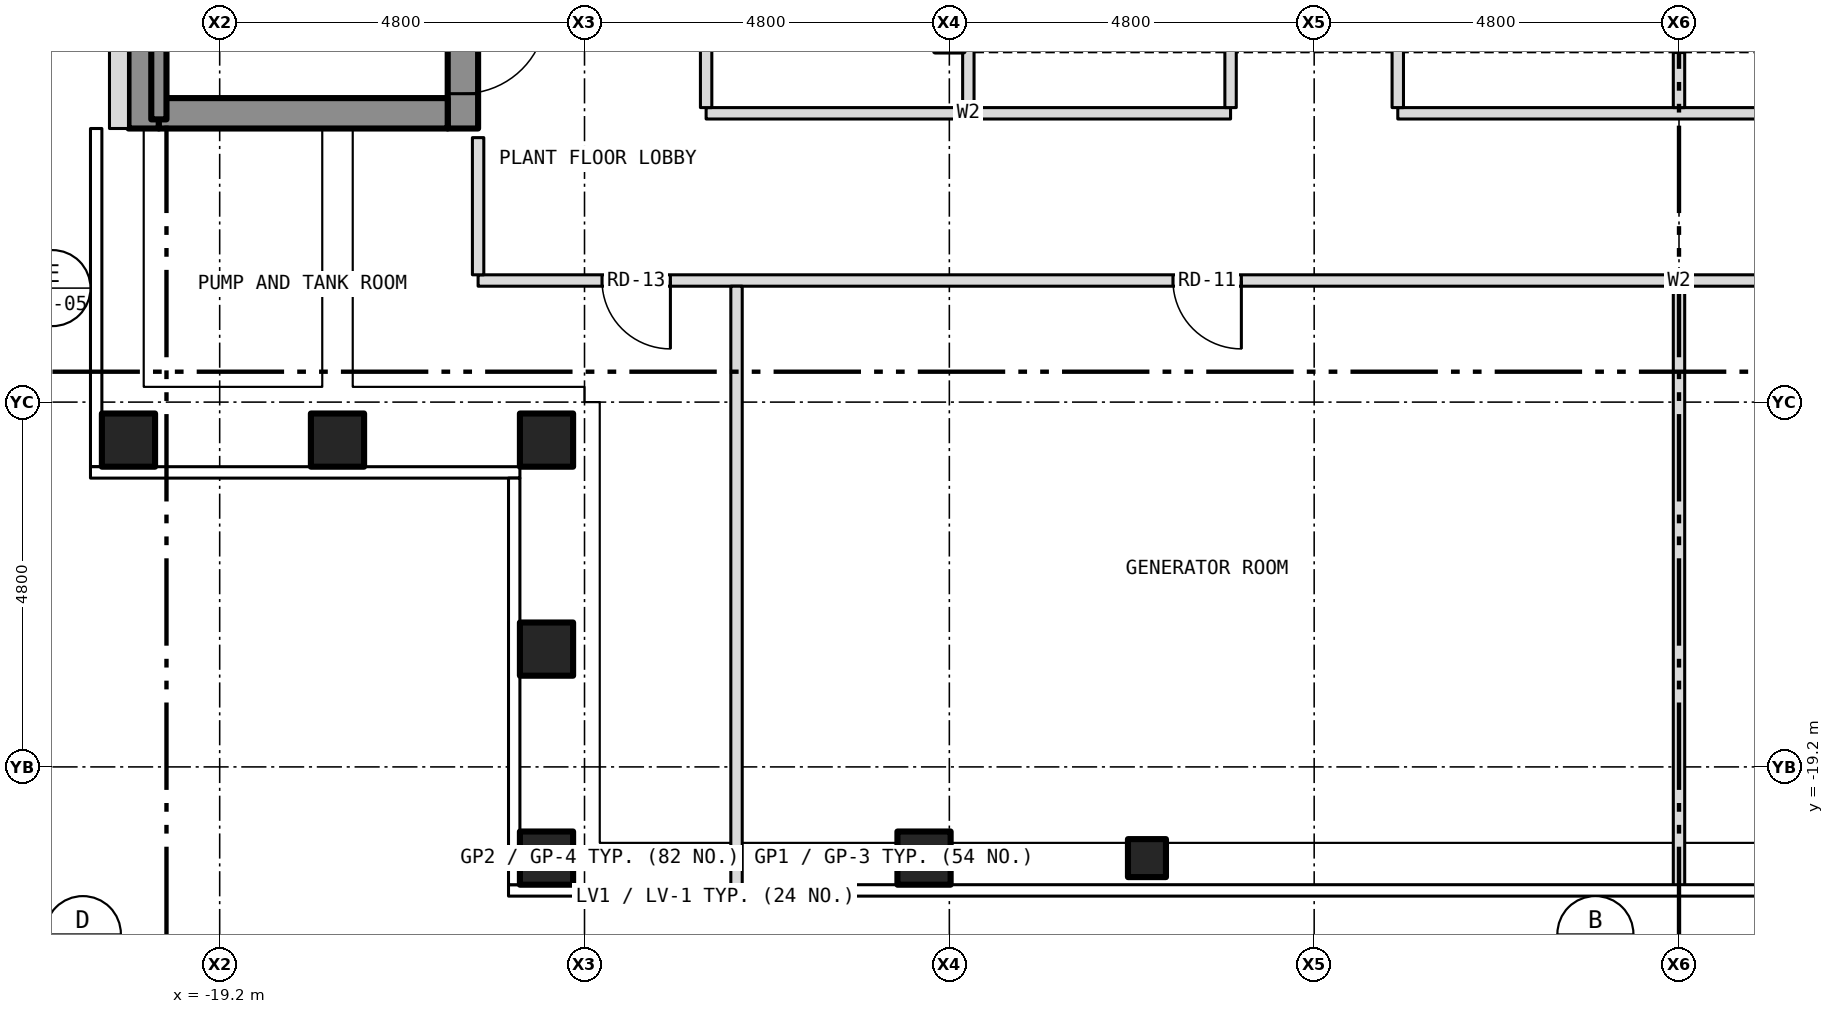
"""IFC4 building model, lengths in metres.
Left out: names, types, materials, properties, quantities, classifications, styles, units other than length and angle.
Written with IfcOpenShell. Run it as: python <this file> out.ifc"""

import sys

from ifc_helpers import new_model, si_unit, direction, frame, frame_2d, origin, origin_2d, place, context, subcontext, project, spatial, rectangle, hollow_rectangle, extrude, element, fill, save


model = new_model("IFC4")
c1 = context("Model", 3, precision=1e-05, world=origin(), true_north=direction((0.0, 1.0)))
c2 = subcontext(c1, "Body", "Model", "MODEL_VIEW")
j1 = project(units=[si_unit("LENGTHUNIT", "METRE"), si_unit("PLANEANGLEUNIT", "RADIAN")], contexts=[c1])
p1 = place(None, origin())
s1 = spatial("IfcSite", under=j1, at=p1, CompositionType="ELEMENT")
p2 = place(p1, origin())
s2 = spatial("IfcBuilding", under=s1, at=p2, CompositionType="ELEMENT")
p3 = place(p2, frame((0.0, 0.0, 236.5)))
s3 = spatial("IfcBuildingStorey", under=s2, at=p3, CompositionType="ELEMENT", Elevation=236.5)
for number, where, z_axis, x_axis in (
    (1, (-14.9, -20.4, -0.3), (0.0, 0.0, 1.0), (1.0, 0.0, 0.0)),
    (2, (-9.933, -20.4, -0.3), (0.0, 0.0, 1.0), (1.0, 0.0, 0.0)),
    (3, (-20.4, -14.9, -0.3), (0.0, 0.0, 1.0), (1.0, 0.0, 0.0)),
    (4, (-14.9, -14.9, -0.3), (0.0, 0.0, 1.0), (1.0, 0.0, 0.0)),
    (5, (-14.9, -17.65, -0.3), (0.0, 0.0, 1.0), (1.0, 0.0, 0.0)),
    (6, (-17.65, -14.9, -0.3), (0.0, 0.0, 1.0), (1.0, 0.0, 0.0)),
):
    element("IfcColumn", number, at=place(p3, frame(where, z_axis=z_axis, x_axis=x_axis)), inside=s3, PredefinedType="COLUMN", context=c2, shape_type="SweptSolid", body=[
        extrude(hollow_rectangle(XDim=0.7, YDim=0.7, WallThickness=0.04, at=origin_2d()), origin(), (0.0, 0.0, 1.0), 4.65),
    ])
p4 = place(p3, frame((-7.0, -20.4, -0.3), z_axis=(0.0, 0.0, 1.0), x_axis=(1.0, 0.0, 0.0)))
e7 = element("IfcColumn", 7, at=p4, inside=s3, PredefinedType="COLUMN", context=c2, shape_type="SweptSolid", body=[
    extrude(hollow_rectangle(XDim=0.5, YDim=0.5, WallThickness=0.03, at=origin_2d()), origin(), (0.0, 0.0, 1.0), 4.65),
])
p5 = place(p3, frame((-16.0, -10.8, 0.0), z_axis=(0.0, 0.0, 1.0), x_axis=(0.0, 1.0, 0.0)))
e8 = element("IfcWall", 8, at=p5, inside=s3, PredefinedType="SHEAR", context=c2, shape_type="SweptSolid", body=[
    extrude(rectangle(XDim=21.6, YDim=0.4, at=frame_2d((10.8, 0.0))), origin(), (0.0, 0.0, 1.0), 3.9),
])
p6 = place(p5, frame((9.4, 0.0, 0.0)))
e9 = element("IfcOpeningElement", 9, at=p6, cuts=e8, PredefinedType="OPENING", context=c2, shape_type="SweptSolid", body=[
    extrude(rectangle(XDim=1.1, YDim=2.1, at=frame_2d((0.55, 1.05))), frame((0.0, 0.212, 0.0), z_axis=(0.0, -1.0, 0.0), x_axis=(1.0, 0.0, 0.0)), (0.0, 0.0, 1.0), 0.424),
])
p7 = place(p5, frame((11.5, 0.0, 0.0)))
e10 = element("IfcOpeningElement", 10, at=p7, cuts=e8, PredefinedType="OPENING", context=c2, shape_type="SweptSolid", body=[
    extrude(rectangle(XDim=1.1, YDim=2.1, at=frame_2d((0.55, 1.05))), frame((0.0, 0.212, 0.0), z_axis=(0.0, -1.0, 0.0), x_axis=(1.0, 0.0, 0.0)), (0.0, 0.0, 1.0), 0.424),
])
p8 = place(p5, frame((13.6, 0.0, 0.0)))
e11 = element("IfcOpeningElement", 11, at=p8, cuts=e8, PredefinedType="OPENING", context=c2, shape_type="SweptSolid", body=[
    extrude(rectangle(XDim=1.1, YDim=2.1, at=frame_2d((0.55, 1.05))), frame((0.0, 0.212, 0.0), z_axis=(0.0, -1.0, 0.0), x_axis=(1.0, 0.0, 0.0)), (0.0, 0.0, 1.0), 0.424),
])
p9 = place(p5, frame((15.7, 0.0, 0.0)))
e12 = element("IfcOpeningElement", 12, at=p9, cuts=e8, PredefinedType="OPENING", context=c2, shape_type="SweptSolid", body=[
    extrude(rectangle(XDim=1.1, YDim=2.1, at=frame_2d((0.55, 1.05))), frame((0.0, 0.212, 0.0), z_axis=(0.0, -1.0, 0.0), x_axis=(1.0, 0.0, 0.0)), (0.0, 0.0, 1.0), 0.424),
])
p10 = place(p5, frame((17.8, 0.0, 0.0)))
e13 = element("IfcOpeningElement", 13, at=p10, cuts=e8, PredefinedType="OPENING", context=c2, shape_type="SweptSolid", body=[
    extrude(rectangle(XDim=1.1, YDim=2.1, at=frame_2d((0.55, 1.05))), frame((0.0, 0.212, 0.0), z_axis=(0.0, -1.0, 0.0), x_axis=(1.0, 0.0, 0.0)), (0.0, 0.0, 1.0), 0.424),
])
p11 = place(p5, frame((0.458, 0.0, 0.0)))
e14 = element("IfcOpeningElement", 14, at=p11, cuts=e8, PredefinedType="OPENING", context=c2, shape_type="SweptSolid", body=[
    extrude(rectangle(XDim=1.1, YDim=2.1, at=frame_2d((0.55, 1.05))), frame((0.0, 0.212, 0.0), z_axis=(0.0, -1.0, 0.0), x_axis=(1.0, 0.0, 0.0)), (0.0, 0.0, 1.0), 0.424),
])
p12 = place(p5, frame((7.5, 0.0, 0.0)))
e15 = element("IfcOpeningElement", 15, at=p12, cuts=e8, PredefinedType="OPENING", context=c2, shape_type="SweptSolid", body=[
    extrude(rectangle(XDim=1.1, YDim=2.1, at=frame_2d((0.55, 1.05))), frame((0.0, 0.212, 0.0), z_axis=(0.0, -1.0, 0.0), x_axis=(1.0, 0.0, 0.0)), (0.0, 0.0, 1.0), 0.424),
])
p13 = place(p5, frame((20.0, 0.0, 0.0)))
e16 = element("IfcOpeningElement", 16, at=p13, cuts=e8, PredefinedType="OPENING", context=c2, shape_type="SweptSolid", body=[
    extrude(rectangle(XDim=0.9, YDim=2.1, at=frame_2d((0.45, 1.05))), frame((0.0, 0.212, 0.0), z_axis=(0.0, -1.0, 0.0), x_axis=(1.0, 0.0, 0.0)), (0.0, 0.0, 1.0), 0.424),
])
p14 = place(p3, frame((-20.2, -10.8, 0.0), z_axis=(0.0, 0.0, 1.0), x_axis=(0.0, 1.0, 0.0)))
e17 = element("IfcWall", 17, at=p14, inside=s3, PredefinedType="SHEAR", context=c2, shape_type="SweptSolid", body=[
    extrude(rectangle(XDim=21.6, YDim=0.4, at=frame_2d((10.8, 0.0))), origin(), (0.0, 0.0, 1.0), 3.9),
])
p15 = place(p3, frame((-20.0, -10.6, 0.0), z_axis=(0.0, 0.0, 1.0), x_axis=(1.0, 0.0, 0.0)))
e18 = element("IfcWall", 18, at=p15, inside=s3, PredefinedType="SHEAR", context=c2, shape_type="SweptSolid", body=[
    extrude(rectangle(XDim=3.8, YDim=0.4, at=frame_2d((1.9, 0.0))), origin(), (0.0, 0.0, 1.0), 3.9),
])
p16 = place(p3, frame((-20.525, 10.8, 0.0), z_axis=(0.0, 0.0, 1.0), x_axis=(0.0, -1.0, 0.0)))
e19 = element("IfcWall", 19, at=p16, inside=s3, PredefinedType="SOLIDWALL", context=c2, shape_type="SweptSolid", body=[
    extrude(rectangle(XDim=21.6, YDim=0.25, at=frame_2d((10.8, 0.0))), origin(), (0.0, 0.0, 1.0), 4.5),
])
p17 = place(p16, frame((3.0, 0.0, 2.2)))
e20 = element("IfcOpeningElement", 20, at=p17, cuts=e19, PredefinedType="OPENING", context=c2, shape_type="SweptSolid", body=[
    extrude(rectangle(XDim=1.2, YDim=0.6, at=frame_2d((0.6, 0.3))), frame((0.0, 0.137, 0.0), z_axis=(0.0, -1.0, 0.0), x_axis=(1.0, 0.0, 0.0)), (0.0, 0.0, 1.0), 0.274),
])
p18 = place(p16, frame((7.8, 0.0, 2.2)))
e21 = element("IfcOpeningElement", 21, at=p18, cuts=e19, PredefinedType="OPENING", context=c2, shape_type="SweptSolid", body=[
    extrude(rectangle(XDim=1.2, YDim=0.6, at=frame_2d((0.6, 0.3))), frame((0.0, 0.137, 0.0), z_axis=(0.0, -1.0, 0.0), x_axis=(1.0, 0.0, 0.0)), (0.0, 0.0, 1.0), 0.274),
])
p19 = place(p16, frame((12.6, 0.0, 2.2)))
e22 = element("IfcOpeningElement", 22, at=p19, cuts=e19, PredefinedType="OPENING", context=c2, shape_type="SweptSolid", body=[
    extrude(rectangle(XDim=1.2, YDim=0.6, at=frame_2d((0.6, 0.3))), frame((0.0, 0.137, 0.0), z_axis=(0.0, -1.0, 0.0), x_axis=(1.0, 0.0, 0.0)), (0.0, 0.0, 1.0), 0.274),
])
p20 = place(p16, frame((17.4, 0.0, 2.2)))
e23 = element("IfcOpeningElement", 23, at=p20, cuts=e19, PredefinedType="OPENING", context=c2, shape_type="SweptSolid", body=[
    extrude(rectangle(XDim=1.2, YDim=0.6, at=frame_2d((0.6, 0.3))), frame((0.0, 0.137, 0.0), z_axis=(0.0, -1.0, 0.0), x_axis=(1.0, 0.0, 0.0)), (0.0, 0.0, 1.0), 0.274),
])
p21 = place(p3, frame((-15.8, -12.8, 0.0), z_axis=(0.0, 0.0, 1.0), x_axis=(1.0, 0.0, 0.0)))
e24 = element("IfcWall", 24, at=p21, inside=s3, PredefinedType="PARTITIONING", context=c2, shape_type="SweptSolid", body=[
    extrude(rectangle(XDim=31.6, YDim=0.15, at=frame_2d((15.8, 0.0))), origin(), (0.0, 0.0, 1.0), 4.35),
])
p22 = place(p21, frame((9.142, 0.0, 0.0)))
e25 = element("IfcOpeningElement", 25, at=p22, cuts=e24, PredefinedType="OPENING", context=c2, shape_type="SweptSolid", body=[
    extrude(rectangle(XDim=0.9, YDim=2.1, at=frame_2d((0.45, 1.05))), frame((0.0, 0.087, 0.0), z_axis=(0.0, -1.0, 0.0), x_axis=(1.0, 0.0, 0.0)), (0.0, 0.0, 1.0), 0.174),
])
p23 = place(p21, frame((21.559, 0.0, 0.0)))
e26 = element("IfcOpeningElement", 26, at=p23, cuts=e24, PredefinedType="OPENING", context=c2, shape_type="SweptSolid", body=[
    extrude(rectangle(XDim=0.9, YDim=2.1, at=frame_2d((0.45, 1.05))), frame((0.0, 0.087, 0.0), z_axis=(0.0, -1.0, 0.0), x_axis=(1.0, 0.0, 0.0)), (0.0, 0.0, 1.0), 0.174),
])
p24 = place(p21, frame((1.63, 0.0, 0.0)))
e27 = element("IfcOpeningElement", 27, at=p24, cuts=e24, PredefinedType="OPENING", context=c2, shape_type="SweptSolid", body=[
    extrude(rectangle(XDim=0.9, YDim=2.1, at=frame_2d((0.45, 1.05))), frame((0.0, 0.087, 0.0), z_axis=(0.0, -1.0, 0.0), x_axis=(1.0, 0.0, 0.0)), (0.0, 0.0, 1.0), 0.174),
])
p25 = place(p21, frame((29.08, 0.0, 0.0)))
e28 = element("IfcOpeningElement", 28, at=p25, cuts=e24, PredefinedType="OPENING", context=c2, shape_type="SweptSolid", body=[
    extrude(rectangle(XDim=0.9, YDim=2.1, at=frame_2d((0.45, 1.05))), frame((0.0, 0.087, 0.0), z_axis=(0.0, -1.0, 0.0), x_axis=(1.0, 0.0, 0.0)), (0.0, 0.0, 1.0), 0.174),
])
p26 = place(p3, frame((-12.8, -10.6, 0.0), z_axis=(0.0, 0.0, 1.0), x_axis=(1.0, 0.0, 0.0)))
e29 = element("IfcWall", 29, at=p26, inside=s3, PredefinedType="PARTITIONING", context=c2, shape_type="SweptSolid", body=[
    extrude(rectangle(XDim=6.9, YDim=0.15, at=frame_2d((3.45, 0.0))), origin(), (0.0, 0.0, 1.0), 4.35),
])
p27 = place(p3, frame((-3.7, -10.6, 0.0), z_axis=(0.0, 0.0, 1.0), x_axis=(1.0, 0.0, 0.0)))
e30 = element("IfcWall", 30, at=p27, inside=s3, PredefinedType="PARTITIONING", context=c2, shape_type="SweptSolid", body=[
    extrude(rectangle(XDim=7.4, YDim=0.15, at=frame_2d((3.7, 0.0))), origin(), (0.0, 0.0, 1.0), 4.35),
])
p28 = place(p3, frame((-20.0, -10.68, 0.0), z_axis=(0.0, 0.0, 1.0), x_axis=(0.0, 1.0, 0.0)))
e31 = element("IfcWall", 31, at=p28, inside=s3, PredefinedType="SHEAR", context=c2, shape_type="SweptSolid", body=[
    extrude(rectangle(XDim=6.98, YDim=0.2, at=frame_2d((3.49, 0.0))), origin(), (0.0, 0.0, 1.0), 3.9),
])
p29 = place(p3, frame((-15.8, -12.725, 0.0), z_axis=(0.0, 0.0, 1.0), x_axis=(0.0, 1.0, 0.0)))
e32 = element("IfcWall", 32, at=p29, inside=s3, PredefinedType="PARTITIONING", context=c2, shape_type="SweptSolid", body=[
    extrude(rectangle(XDim=1.805, YDim=0.15, at=frame_2d((0.903, 0.0))), origin(), (0.0, 0.0, 1.0), 4.35),
])
p30 = place(p3, frame((-12.8, -10.525, 0.0), z_axis=(0.0, 0.0, 1.0), x_axis=(0.0, 1.0, 0.0)))
e33 = element("IfcWall", 33, at=p30, inside=s3, PredefinedType="PARTITIONING", context=c2, shape_type="SweptSolid", body=[
    extrude(rectangle(XDim=8.525, YDim=0.15, at=frame_2d((4.262, 0.0))), origin(), (0.0, 0.0, 1.0), 4.35),
])
p31 = place(p30, frame((3.05, 0.0, 0.0)))
e34 = element("IfcOpeningElement", 34, at=p31, cuts=e33, PredefinedType="OPENING", context=c2, shape_type="SweptSolid", body=[
    extrude(rectangle(XDim=0.9, YDim=2.1, at=frame_2d((0.45, 1.05))), frame((0.0, 0.087, 0.0), z_axis=(0.0, -1.0, 0.0), x_axis=(1.0, 0.0, 0.0)), (0.0, 0.0, 1.0), 0.174),
])
p32 = place(p3, frame((-12.4, -20.78, 0.0), z_axis=(0.0, 0.0, 1.0), x_axis=(0.0, 1.0, 0.0)))
e35 = element("IfcWall", 35, at=p32, inside=s3, PredefinedType="PARTITIONING", context=c2, shape_type="SweptSolid", body=[
    extrude(rectangle(XDim=7.905, YDim=0.15, at=frame_2d((3.953, 0.0))), origin(), (0.0, 0.0, 1.0), 4.35),
])
p33 = place(p3, frame((-9.35, -10.525, 0.0), z_axis=(0.0, 0.0, 1.0), x_axis=(0.0, 1.0, 0.0)))
e36 = element("IfcWall", 36, at=p33, inside=s3, PredefinedType="PARTITIONING", context=c2, shape_type="SweptSolid", body=[
    extrude(rectangle(XDim=7.0, YDim=0.15, at=frame_2d((3.5, 0.0))), origin(), (0.0, 0.0, 1.0), 4.35),
])
p34 = place(p3, frame((-5.9, -10.525, 0.0), z_axis=(0.0, 0.0, 1.0), x_axis=(0.0, 1.0, 0.0)))
e37 = element("IfcWall", 37, at=p34, inside=s3, PredefinedType="PARTITIONING", context=c2, shape_type="SweptSolid", body=[
    extrude(rectangle(XDim=14.15, YDim=0.15, at=frame_2d((7.075, 0.0))), origin(), (0.0, 0.0, 1.0), 4.35),
])
p35 = place(p34, frame((3.05, 0.0, 0.0)))
e38 = element("IfcOpeningElement", 38, at=p35, cuts=e37, PredefinedType="OPENING", context=c2, shape_type="SweptSolid", body=[
    extrude(rectangle(XDim=0.9, YDim=2.1, at=frame_2d((0.45, 1.05))), frame((0.0, 0.087, 0.0), z_axis=(0.0, -1.0, 0.0), x_axis=(1.0, 0.0, 0.0)), (0.0, 0.0, 1.0), 0.174),
])
p36 = place(p34, frame((10.8, 0.0, 0.0)))
e39 = element("IfcOpeningElement", 39, at=p36, cuts=e37, PredefinedType="OPENING", context=c2, shape_type="SweptSolid", body=[
    extrude(rectangle(XDim=0.9, YDim=2.1, at=frame_2d((0.45, 1.05))), frame((0.0, 0.087, 0.0), z_axis=(0.0, -1.0, 0.0), x_axis=(1.0, 0.0, 0.0)), (0.0, 0.0, 1.0), 0.174),
])
p37 = place(p3, frame((-3.7, -10.525, 0.0), z_axis=(0.0, 0.0, 1.0), x_axis=(0.0, 1.0, 0.0)))
e40 = element("IfcWall", 40, at=p37, inside=s3, PredefinedType="PARTITIONING", context=c2, shape_type="SweptSolid", body=[
    extrude(rectangle(XDim=14.15, YDim=0.15, at=frame_2d((7.075, 0.0))), origin(), (0.0, 0.0, 1.0), 4.35),
])
p38 = place(p37, frame((3.05, 0.0, 0.0)))
e41 = element("IfcOpeningElement", 41, at=p38, cuts=e40, PredefinedType="OPENING", context=c2, shape_type="SweptSolid", body=[
    extrude(rectangle(XDim=0.9, YDim=2.1, at=frame_2d((0.45, 1.05))), frame((0.0, 0.087, 0.0), z_axis=(0.0, -1.0, 0.0), x_axis=(1.0, 0.0, 0.0)), (0.0, 0.0, 1.0), 0.174),
])
p39 = place(p37, frame((10.8, 0.0, 0.0)))
e42 = element("IfcOpeningElement", 42, at=p39, cuts=e40, PredefinedType="OPENING", context=c2, shape_type="SweptSolid", body=[
    extrude(rectangle(XDim=0.9, YDim=2.1, at=frame_2d((0.45, 1.05))), frame((0.0, 0.087, 0.0), z_axis=(0.0, -1.0, 0.0), x_axis=(1.0, 0.0, 0.0)), (0.0, 0.0, 1.0), 0.174),
])
p40 = place(p3, frame((0.0, -20.78, 0.0), z_axis=(0.0, 0.0, 1.0), x_axis=(0.0, 1.0, 0.0)))
e43 = element("IfcWall", 43, at=p40, inside=s3, PredefinedType="PARTITIONING", context=c2, shape_type="SweptSolid", body=[
    extrude(rectangle(XDim=7.905, YDim=0.15, at=frame_2d((3.953, 0.0))), origin(), (0.0, 0.0, 1.0), 3.728),
])
p41 = place(p3, frame((0.0, -10.525, 0.0), z_axis=(0.0, 0.0, 1.0), x_axis=(0.0, 1.0, 0.0)))
e44 = element("IfcWall", 44, at=p41, inside=s3, PredefinedType="PARTITIONING", context=c2, shape_type="SweptSolid", body=[
    extrude(rectangle(XDim=0.725, YDim=0.15, at=frame_2d((0.362, 0.0))), origin(), (0.0, 0.0, 1.0), 3.728),
])
p42 = place(p11, origin())
e45 = element("IfcDoor", 45, at=p42, inside=s3, OperationType="SINGLE_SWING_RIGHT", PredefinedType="DOOR", context=c2, shape_type="SweptSolid", body=[
    extrude(rectangle(XDim=1.1, YDim=2.1, at=frame_2d((0.55, 1.05))), frame((0.0, 0.025, 0.0), z_axis=(0.0, -1.0, 0.0), x_axis=(1.0, 0.0, 0.0)), (0.0, 0.0, 1.0), 0.05),
])
fill(e14, e45)
p43 = place(p22, origin())
e46 = element("IfcDoor", 46, at=p43, inside=s3, OperationType="SINGLE_SWING_RIGHT", PredefinedType="DOOR", context=c2, shape_type="SweptSolid", body=[
    extrude(rectangle(XDim=0.9, YDim=2.1, at=frame_2d((0.45, 1.05))), frame((0.0, 0.025, 0.0), z_axis=(0.0, -1.0, 0.0), x_axis=(1.0, 0.0, 0.0)), (0.0, 0.0, 1.0), 0.05),
])
fill(e25, e46)
p44 = place(p24, origin())
e47 = element("IfcDoor", 47, at=p44, inside=s3, OperationType="SINGLE_SWING_RIGHT", PredefinedType="DOOR", context=c2, shape_type="SweptSolid", body=[
    extrude(rectangle(XDim=0.9, YDim=2.1, at=frame_2d((0.45, 1.05))), frame((0.0, 0.025, 0.0), z_axis=(0.0, -1.0, 0.0), x_axis=(1.0, 0.0, 0.0)), (0.0, 0.0, 1.0), 0.05),
])
fill(e27, e47)
save(model, sys.argv[1])
